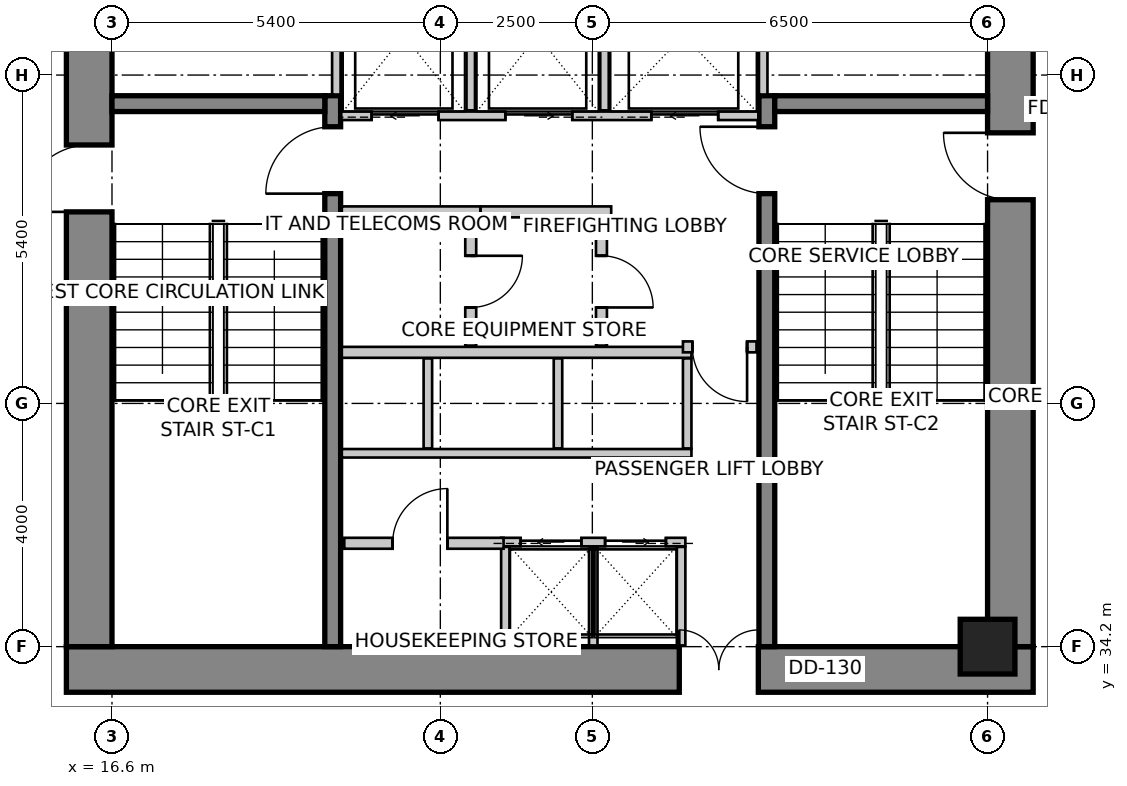
"""IFC4 building model, lengths in metres.
Left out: names, types, materials, properties, quantities, classifications, styles, units other than length and angle.
Written with IfcOpenShell. Run it as: python <this file> out.ifc"""

import sys

from ifc_helpers import new_model, si_unit, direction, frame, frame_2d, origin, origin_2d, place, context, subcontext, project, spatial, rectangle, extrude, source, transform, mapped, element, fill, save


model = new_model("IFC4")
c1 = context("Model", 3, precision=1e-05, world=origin(), true_north=direction((0.0, 1.0)))
c2 = subcontext(c1, "Body", "Model", "MODEL_VIEW")
j1 = project(units=[si_unit("LENGTHUNIT", "METRE"), si_unit("PLANEANGLEUNIT", "RADIAN")], contexts=[c1])
p1 = place(None, origin())
s1 = spatial("IfcSite", under=j1, at=p1, CompositionType="ELEMENT")
p2 = place(p1, origin())
s2 = spatial("IfcBuilding", under=s1, at=p2, CompositionType="ELEMENT")
p3 = place(p2, frame((0.0, 0.0, 135.8)))
s3 = spatial("IfcBuildingStorey", under=s2, at=p3, CompositionType="ELEMENT", Elevation=135.8)
p4 = place(p3, frame((15.85, 33.825, 0.0), z_axis=(0.0, 0.0, 1.0), x_axis=(1.0, 0.0, 0.0)))
e1 = element("IfcWall", 1, at=p4, inside=s3, PredefinedType="SHEAR", context=c2, shape_type="SweptSolid", body=[
    extrude(rectangle(XDim=15.9, YDim=0.75, at=frame_2d((7.95, 0.0))), origin(), (0.0, 0.0, 1.0), 3.6),
])
m1 = source(origin(), c2, "Body", "SweptSolid", [
    extrude(rectangle(XDim=1.3, YDim=2.15, at=frame_2d((0.65, 1.075))), frame((0.0, 0.385, 0.0), z_axis=(0.0, -1.0, 0.0), x_axis=(1.0, 0.0, 0.0)), (0.0, 0.0, 1.0), 0.77),
])
p5 = place(p4, frame((10.08, 0.0, 0.0)))
e2 = element("IfcOpeningElement", 2, at=p5, cuts=e1, PredefinedType="OPENING", context=c2, shape_type="MappedRepresentation", body=[
    mapped(m1, transform((0.0, 0.0, 0.0), scale=1.0)),
])
p6 = place(p3, frame((16.225, 34.2, 0.0), z_axis=(0.0, 0.0, 1.0), x_axis=(0.0, 1.0, 0.0)))
e3 = element("IfcWall", 3, at=p6, inside=s3, PredefinedType="SHEAR", context=c2, shape_type="SweptSolid", body=[
    extrude(rectangle(XDim=11.4, YDim=0.75, at=frame_2d((5.7, 0.0))), origin(), (0.0, 0.0, 1.0), 3.6),
])
m2 = source(origin(), c2, "Body", "SweptSolid", [
    extrude(rectangle(XDim=1.1, YDim=2.15, at=frame_2d((0.55, 1.075))), frame((0.0, 0.385, 0.0), z_axis=(0.0, -1.0, 0.0), x_axis=(1.0, 0.0, 0.0)), (0.0, 0.0, 1.0), 0.77),
])
p7 = place(p6, frame((7.15, 0.0, 0.0)))
e4 = element("IfcOpeningElement", 4, at=p7, cuts=e3, PredefinedType="OPENING", context=c2, shape_type="MappedRepresentation", body=[
    mapped(m2, transform((0.0, 0.0, 0.0), scale=1.0)),
])
p8 = place(p3, frame((31.375, 34.2, 0.0), z_axis=(0.0, 0.0, 1.0), x_axis=(0.0, 1.0, 0.0)))
e5 = element("IfcWall", 5, at=p8, inside=s3, PredefinedType="SHEAR", context=c2, shape_type="SweptSolid", body=[
    extrude(rectangle(XDim=11.4, YDim=0.75, at=frame_2d((5.7, 0.0))), origin(), (0.0, 0.0, 1.0), 3.6),
])
p9 = place(p8, frame((7.35, 0.0, 0.0)))
e6 = element("IfcOpeningElement", 6, at=p9, cuts=e5, PredefinedType="OPENING", context=c2, shape_type="MappedRepresentation", body=[
    mapped(m2, transform((0.0, 0.0, 0.0), scale=1.0)),
])
p10 = place(p3, frame((20.23, 34.2, 0.0), z_axis=(0.0, 0.0, 1.0), x_axis=(0.0, 1.0, 0.0)))
e7 = element("IfcWall", 7, at=p10, inside=s3, PredefinedType="SHEAR", context=c2, shape_type="SweptSolid", body=[
    extrude(rectangle(XDim=9.06, YDim=0.26, at=frame_2d((4.53, 0.0))), origin(), (0.0, 0.0, 1.0), 3.6),
])
m3 = source(origin(), c2, "Body", "SweptSolid", [
    extrude(rectangle(XDim=1.1, YDim=2.15, at=frame_2d((0.55, 1.075))), frame((0.0, 0.14, 0.0), z_axis=(0.0, -1.0, 0.0), x_axis=(1.0, 0.0, 0.0)), (0.0, 0.0, 1.0), 0.28),
])
p11 = place(p10, frame((7.45, 0.0, 0.0)))
e8 = element("IfcOpeningElement", 8, at=p11, cuts=e7, PredefinedType="OPENING", context=c2, shape_type="MappedRepresentation", body=[
    mapped(m3, transform((0.0, 0.0, 0.0), scale=1.0)),
])
p12 = place(p3, frame((27.37, 34.2, 0.0), z_axis=(0.0, 0.0, 1.0), x_axis=(0.0, 1.0, 0.0)))
e9 = element("IfcWall", 9, at=p12, inside=s3, PredefinedType="SHEAR", context=c2, shape_type="SweptSolid", body=[
    extrude(rectangle(XDim=9.06, YDim=0.26, at=frame_2d((4.53, 0.0))), origin(), (0.0, 0.0, 1.0), 3.6),
])
p13 = place(p12, frame((7.45, 0.0, 0.0)))
e10 = element("IfcOpeningElement", 10, at=p13, cuts=e9, PredefinedType="OPENING", context=c2, shape_type="MappedRepresentation", body=[
    mapped(m3, transform((0.0, 0.0, 0.0), scale=1.0)),
])
for number, where, z_axis, x_axis in (
    (11, (16.6, 43.13, 0.0), (0.0, 0.0, 1.0), (1.0, 0.0, 0.0)),
    (12, (27.5, 43.13, 0.0), (0.0, 0.0, 1.0), (1.0, 0.0, 0.0)),
):
    element("IfcWall", number, at=place(p3, frame(where, z_axis=z_axis, x_axis=x_axis)), inside=s3, PredefinedType="SHEAR", context=c2, shape_type="SweptSolid", body=[
        extrude(rectangle(XDim=3.5, YDim=0.26, at=frame_2d((1.75, 0.0))), origin(), (0.0, 0.0, 1.0), 3.6),
    ])
m4 = source(origin(), c2, "Body", "SweptSolid", [
    extrude(rectangle(XDim=0.9, YDim=0.9, at=origin_2d()), origin(), (0.0, 0.0, 1.0), 3.6),
])
p14 = place(p3, frame((31.0, 34.2, 0.0), z_axis=(0.0, 0.0, 1.0), x_axis=(1.0, 0.0, 0.0)))
e13 = element("IfcColumn", 13, at=p14, inside=s3, PredefinedType="COLUMN", context=c2, shape_type="MappedRepresentation", body=[
    mapped(m4, transform((0.0, 0.0, 0.0), scale=1.0)),
])
p15 = place(p3, frame((20.37, 42.93, 0.0), z_axis=(0.0, 0.0, 1.0), x_axis=(1.0, 0.0, 0.0)))
e14 = element("IfcWall", 14, at=p15, inside=s3, PredefinedType="SOLIDWALL", context=c2, shape_type="SweptSolid", body=[
    extrude(rectangle(XDim=6.86, YDim=0.14, at=frame_2d((3.43, 0.0))), origin(), (0.0, 0.0, 1.0), 3.3),
])
m5 = source(origin(), c2, "Body", "SweptSolid", [
    extrude(rectangle(XDim=1.1, YDim=2.15, at=frame_2d((0.55, 1.075))), frame((0.0, 0.08, 0.0), z_axis=(0.0, -1.0, 0.0), x_axis=(1.0, 0.0, 0.0)), (0.0, 0.0, 1.0), 0.16),
])
p16 = place(p15, frame((0.5, 0.0, 0.0)))
e15 = element("IfcOpeningElement", 15, at=p16, cuts=e14, PredefinedType="OPENING", context=c2, shape_type="MappedRepresentation", body=[
    mapped(m5, transform((0.0, 0.0, 0.0), scale=1.0)),
])
p17 = place(p15, frame((2.7, 0.0, 0.0)))
e16 = element("IfcOpeningElement", 16, at=p17, cuts=e14, PredefinedType="OPENING", context=c2, shape_type="MappedRepresentation", body=[
    mapped(m5, transform((0.0, 0.0, 0.0), scale=1.0)),
])
p18 = place(p15, frame((5.1, 0.0, 0.0)))
e17 = element("IfcOpeningElement", 17, at=p18, cuts=e14, PredefinedType="OPENING", context=c2, shape_type="MappedRepresentation", body=[
    mapped(m5, transform((0.0, 0.0, 0.0), scale=1.0)),
])
for number, where, z_axis, x_axis in (
    (18, (20.29, 43.28, 0.0), (0.0, 0.0, 1.0), (0.0, 1.0, 0.0)),
    (19, (27.31, 43.28, 0.0), (0.0, 0.0, 1.0), (0.0, 1.0, 0.0)),
):
    element("IfcWall", number, at=place(p3, frame(where, z_axis=z_axis, x_axis=x_axis)), inside=s3, PredefinedType="SOLIDWALL", context=c2, shape_type="SweptSolid", body=[
        extrude(rectangle(XDim=2.3, YDim=0.14, at=frame_2d((1.15, 0.0))), origin(), (0.0, 0.0, 1.0), 3.3),
    ])
for number, where, z_axis, x_axis in (
    (20, (22.5, 43.02, 0.0), (0.0, 0.0, 1.0), (0.0, 1.0, 0.0)),
    (21, (24.7, 43.02, 0.0), (0.0, 0.0, 1.0), (0.0, 1.0, 0.0)),
):
    element("IfcWall", number, at=place(p3, frame(where, z_axis=z_axis, x_axis=x_axis)), inside=s3, PredefinedType="SOLIDWALL", context=c2, shape_type="SweptSolid", body=[
        extrude(rectangle(XDim=2.56, YDim=0.14, at=frame_2d((1.28, 0.0))), origin(), (0.0, 0.0, 1.0), 3.3),
    ])
p19 = place(p3, frame((23.0, 35.92, 0.0), z_axis=(0.0, 0.0, 1.0), x_axis=(1.0, 0.0, 0.0)))
e22 = element("IfcWall", 22, at=p19, inside=s3, PredefinedType="SOLIDWALL", context=c2, shape_type="SweptSolid", body=[
    extrude(rectangle(XDim=3.03, YDim=0.14, at=frame_2d((1.515, 0.0))), origin(), (0.0, 0.0, 1.0), 3.3),
])
m6 = source(origin(), c2, "Body", "SweptSolid", [
    extrude(rectangle(XDim=1.0, YDim=2.15, at=frame_2d((0.5, 1.075))), frame((0.0, 0.08, 0.0), z_axis=(0.0, -1.0, 0.0), x_axis=(1.0, 0.0, 0.0)), (0.0, 0.0, 1.0), 0.16),
])
p20 = place(p19, frame((0.32, 0.0, 0.0)))
e23 = element("IfcOpeningElement", 23, at=p20, cuts=e22, PredefinedType="OPENING", context=c2, shape_type="MappedRepresentation", body=[
    mapped(m6, transform((0.0, 0.0, 0.0), scale=1.0)),
])
p21 = place(p19, frame((1.71, 0.0, 0.0)))
e24 = element("IfcOpeningElement", 24, at=p21, cuts=e22, PredefinedType="OPENING", context=c2, shape_type="MappedRepresentation", body=[
    mapped(m6, transform((0.0, 0.0, 0.0), scale=1.0)),
])
for number, where, z_axis, x_axis in (
    (25, (25.96, 34.22, 0.0), (0.0, 0.0, 1.0), (0.0, 1.0, 0.0)),
    (26, (23.07, 34.22, 0.0), (0.0, 0.0, 1.0), (0.0, 1.0, 0.0)),
    (27, (24.515, 34.22, 0.0), (0.0, 0.0, 1.0), (0.0, 1.0, 0.0)),
):
    element("IfcWall", number, at=place(p3, frame(where, z_axis=z_axis, x_axis=x_axis)), inside=s3, PredefinedType="SOLIDWALL", context=c2, shape_type="SweptSolid", body=[
        extrude(rectangle(XDim=1.62, YDim=0.14, at=frame_2d((0.81, 0.0))), origin(), (0.0, 0.0, 1.0), 2.592),
    ])
p22 = place(p3, frame((20.38, 37.38, 0.0), z_axis=(0.0, 0.0, 1.0), x_axis=(1.0, 0.0, 0.0)))
e28 = element("IfcWall", 28, at=p22, inside=s3, PredefinedType="SOLIDWALL", context=c2, shape_type="SweptSolid", body=[
    extrude(rectangle(XDim=5.75, YDim=0.14, at=frame_2d((2.875, 0.0))), origin(), (0.0, 0.0, 1.0), 3.3),
])
p23 = place(p3, frame((20.38, 39.04, 0.0), z_axis=(0.0, 0.0, 1.0), x_axis=(1.0, 0.0, 0.0)))
e29 = element("IfcWall", 29, at=p23, inside=s3, PredefinedType="SOLIDWALL", context=c2, shape_type="SweptSolid", body=[
    extrude(rectangle(XDim=5.75, YDim=0.18, at=frame_2d((2.875, 0.0))), origin(), (0.0, 0.0, 1.0), 3.3),
])
for number, where, z_axis, x_axis in (
    (30, (26.06, 37.46, 0.0), (0.0, 0.0, 1.0), (0.0, 1.0, 0.0)),
    (31, (21.795, 37.46, 0.0), (0.0, 0.0, 1.0), (0.0, 1.0, 0.0)),
    (32, (23.935, 37.46, 0.0), (0.0, 0.0, 1.0), (0.0, 1.0, 0.0)),
):
    element("IfcWall", number, at=place(p3, frame(where, z_axis=z_axis, x_axis=x_axis)), inside=s3, PredefinedType="SOLIDWALL", context=c2, shape_type="SweptSolid", body=[
        extrude(rectangle(XDim=1.48, YDim=0.14, at=frame_2d((0.74, 0.0))), origin(), (0.0, 0.0, 1.0), 3.3),
    ])
p24 = place(p3, frame((22.66, 41.35, 0.0), z_axis=(0.0, 0.0, 1.0), x_axis=(-1.0, 0.0, 0.0)))
e33 = element("IfcWall", 33, at=p24, inside=s3, PredefinedType="PARTITIONING", context=c2, shape_type="SweptSolid", body=[
    extrude(rectangle(XDim=2.28, YDim=0.18, at=frame_2d((1.14, 0.0))), origin(), (0.0, 0.0, 1.0), 3.3),
])
p25 = place(p3, frame((24.81, 41.35, 0.0), z_axis=(0.0, 0.0, 1.0), x_axis=(-1.0, 0.0, 0.0)))
e34 = element("IfcWall", 34, at=p25, inside=s3, PredefinedType="PARTITIONING", context=c2, shape_type="SweptSolid", body=[
    extrude(rectangle(XDim=2.148, YDim=0.18, at=frame_2d((1.074, 0.0))), origin(), (0.0, 0.0, 1.0), 3.3),
])
p26 = place(p3, frame((22.5, 41.256, 0.0), z_axis=(0.0, 0.0, 1.0), x_axis=(0.0, -1.0, 0.0)))
e35 = element("IfcWall", 35, at=p26, inside=s3, PredefinedType="PARTITIONING", context=c2, shape_type="SweptSolid", body=[
    extrude(rectangle(XDim=2.106, YDim=0.18, at=frame_2d((1.053, 0.0))), origin(), (0.0, 0.0, 1.0), 3.3),
])
m7 = source(origin(), c2, "Body", "SweptSolid", [
    extrude(rectangle(XDim=0.85, YDim=2.15, at=frame_2d((0.425, 1.075))), frame((0.0, 0.1, 0.0), z_axis=(0.0, -1.0, 0.0), x_axis=(1.0, 0.0, 0.0)), (0.0, 0.0, 1.0), 0.2),
])
p27 = place(p26, frame((0.628, 0.0, 0.0)))
e36 = element("IfcOpeningElement", 36, at=p27, cuts=e35, PredefinedType="OPENING", context=c2, shape_type="MappedRepresentation", body=[
    mapped(m7, transform((0.0, 0.0, 0.0), scale=1.0)),
])
p28 = place(p3, frame((24.65, 41.256, 0.0), z_axis=(0.0, 0.0, 1.0), x_axis=(0.0, -1.0, 0.0)))
e37 = element("IfcWall", 37, at=p28, inside=s3, PredefinedType="PARTITIONING", context=c2, shape_type="SweptSolid", body=[
    extrude(rectangle(XDim=2.106, YDim=0.18, at=frame_2d((1.053, 0.0))), origin(), (0.0, 0.0, 1.0), 3.3),
])
p29 = place(p28, frame((0.628, 0.0, 0.0)))
e38 = element("IfcOpeningElement", 38, at=p29, cuts=e37, PredefinedType="OPENING", context=c2, shape_type="MappedRepresentation", body=[
    mapped(m7, transform((0.0, 0.0, 0.0), scale=1.0)),
])
p30 = place(p3, frame((27.2, 39.13, 0.0), z_axis=(0.0, 0.0, 1.0), x_axis=(-1.0, 0.0, 0.0)))
e39 = element("IfcWall", 39, at=p30, inside=s3, PredefinedType="PARTITIONING", context=c2, shape_type="SweptSolid", body=[
    extrude(rectangle(XDim=1.21, YDim=0.18, at=frame_2d((0.605, 0.0))), origin(), (0.0, 0.0, 1.0), 3.3),
])
m8 = source(origin(), c2, "Body", "SweptSolid", [
    extrude(rectangle(XDim=0.9, YDim=2.15, at=frame_2d((0.45, 1.075))), frame((0.0, 0.1, 0.0), z_axis=(0.0, -1.0, 0.0), x_axis=(1.0, 0.0, 0.0)), (0.0, 0.0, 1.0), 0.2),
])
p31 = place(p30, frame((0.155, 0.0, 0.0)))
e40 = element("IfcOpeningElement", 40, at=p31, cuts=e39, PredefinedType="OPENING", context=c2, shape_type="MappedRepresentation", body=[
    mapped(m8, transform((0.0, 0.0, 0.0), scale=1.0)),
])
p32 = place(p3, frame((20.42, 35.9, 0.0), z_axis=(0.0, 0.0, 1.0), x_axis=(1.0, 0.0, 0.0)))
e41 = element("IfcWall", 41, at=p32, inside=s3, PredefinedType="PARTITIONING", context=c2, shape_type="SweptSolid", body=[
    extrude(rectangle(XDim=2.62, YDim=0.18, at=frame_2d((1.31, 0.0))), origin(), (0.0, 0.0, 1.0), 3.3),
])
p33 = place(p32, frame((0.796, 0.0, 0.0)))
e42 = element("IfcOpeningElement", 42, at=p33, cuts=e41, PredefinedType="OPENING", context=c2, shape_type="MappedRepresentation", body=[
    mapped(m8, transform((0.0, 0.0, 0.0), scale=1.0)),
])
m9 = source(origin(), c2, "Body", "SweptSolid", [
    extrude(rectangle(XDim=1.1, YDim=2.15, at=frame_2d((0.55, 1.075))), frame((0.0, 0.025, 0.0), z_axis=(0.0, -1.0, 0.0), x_axis=(1.0, 0.0, 0.0)), (0.0, 0.0, 1.0), 0.05),
])
p34 = place(p16, origin())
e43 = element("IfcDoor", 43, at=p34, inside=s3, OperationType="SLIDING_TO_LEFT", PredefinedType="DOOR", context=c2, shape_type="MappedRepresentation", body=[
    mapped(m9, transform((0.0, 0.0, 0.0), scale=1.0)),
])
fill(e15, e43)
p35 = place(p17, origin())
e44 = element("IfcDoor", 44, at=p35, inside=s3, OperationType="SLIDING_TO_RIGHT", PredefinedType="DOOR", context=c2, shape_type="MappedRepresentation", body=[
    mapped(m9, transform((0.0, 0.0, 0.0), scale=1.0)),
])
fill(e16, e44)
m10 = source(origin(), c2, "Body", "SweptSolid", [
    extrude(rectangle(XDim=1.1, YDim=2.15, at=frame_2d((0.55, 1.075))), frame((0.0, 0.025, 0.0), z_axis=(0.0, -1.0, 0.0), x_axis=(1.0, 0.0, 0.0)), (0.0, 0.0, 1.0), 0.05),
])
p36 = place(p18, origin())
e45 = element("IfcDoor", 45, at=p36, inside=s3, OperationType="SLIDING_TO_LEFT", PredefinedType="DOOR", context=c2, shape_type="MappedRepresentation", body=[
    mapped(m10, transform((0.0, 0.0, 0.0), scale=1.0)),
])
fill(e17, e45)
m11 = source(origin(), c2, "Body", "SweptSolid", [
    extrude(rectangle(XDim=1.0, YDim=2.15, at=frame_2d((0.5, 1.075))), frame((0.0, 0.025, 0.0), z_axis=(0.0, -1.0, 0.0), x_axis=(1.0, 0.0, 0.0)), (0.0, 0.0, 1.0), 0.05),
])
p37 = place(p20, origin())
e46 = element("IfcDoor", 46, at=p37, inside=s3, OperationType="SLIDING_TO_LEFT", PredefinedType="DOOR", context=c2, shape_type="MappedRepresentation", body=[
    mapped(m11, transform((0.0, 0.0, 0.0), scale=1.0)),
])
fill(e23, e46)
p38 = place(p21, origin())
e47 = element("IfcDoor", 47, at=p38, inside=s3, OperationType="SLIDING_TO_RIGHT", PredefinedType="DOOR", context=c2, shape_type="MappedRepresentation", body=[
    mapped(m11, transform((0.0, 0.0, 0.0), scale=1.0)),
])
fill(e24, e47)
m12 = source(origin(), c2, "Body", "SweptSolid", [
    extrude(rectangle(XDim=1.1, YDim=2.15, at=frame_2d((0.55, 1.075))), frame((0.0, 0.025, 0.0), z_axis=(0.0, -1.0, 0.0), x_axis=(1.0, 0.0, 0.0)), (0.0, 0.0, 1.0), 0.05),
])
p39 = place(p11, origin())
e48 = element("IfcDoor", 48, at=p39, inside=s3, OperationType="SINGLE_SWING_LEFT", PredefinedType="DOOR", context=c2, shape_type="MappedRepresentation", body=[
    mapped(m12, transform((0.0, 0.0, 0.0), scale=1.0)),
])
fill(e8, e48)
p40 = place(p13, origin())
e49 = element("IfcDoor", 49, at=p40, inside=s3, OperationType="SINGLE_SWING_RIGHT", PredefinedType="DOOR", context=c2, shape_type="MappedRepresentation", body=[
    mapped(m12, transform((0.0, 0.0, 0.0), scale=1.0)),
])
fill(e10, e49)
p41 = place(p7, origin())
e50 = element("IfcDoor", 50, at=p41, inside=s3, OperationType="SINGLE_SWING_LEFT", PredefinedType="DOOR", context=c2, shape_type="MappedRepresentation", body=[
    mapped(m12, transform((0.0, 0.0, 0.0), scale=1.0)),
])
fill(e4, e50)
p42 = place(p9, origin())
e51 = element("IfcDoor", 51, at=p42, inside=s3, OperationType="SINGLE_SWING_RIGHT", PredefinedType="DOOR", context=c2, shape_type="MappedRepresentation", body=[
    mapped(m12, transform((0.0, 0.0, 0.0), scale=1.0)),
])
fill(e6, e51)
m13 = source(origin(), c2, "Body", "SweptSolid", [
    extrude(rectangle(XDim=1.3, YDim=2.15, at=frame_2d((0.65, 1.075))), frame((0.0, 0.025, 0.0), z_axis=(0.0, -1.0, 0.0), x_axis=(1.0, 0.0, 0.0)), (0.0, 0.0, 1.0), 0.05),
])
p43 = place(p5, origin())
e52 = element("IfcDoor", 52, at=p43, inside=s3, OperationType="DOUBLE_DOOR_SINGLE_SWING", PredefinedType="DOOR", context=c2, shape_type="MappedRepresentation", body=[
    mapped(m13, transform((0.0, 0.0, 0.0), scale=1.0)),
])
fill(e2, e52)
m14 = source(origin(), c2, "Body", "SweptSolid", [
    extrude(rectangle(XDim=0.85, YDim=2.15, at=frame_2d((0.425, 1.075))), frame((0.0, 0.025, 0.0), z_axis=(0.0, -1.0, 0.0), x_axis=(1.0, 0.0, 0.0)), (0.0, 0.0, 1.0), 0.05),
])
p44 = place(p27, origin())
e53 = element("IfcDoor", 53, at=p44, inside=s3, OperationType="SINGLE_SWING_LEFT", PredefinedType="DOOR", context=c2, shape_type="MappedRepresentation", body=[
    mapped(m14, transform((0.0, 0.0, 0.0), scale=1.0)),
])
fill(e36, e53)
p45 = place(p29, origin())
e54 = element("IfcDoor", 54, at=p45, inside=s3, OperationType="SINGLE_SWING_RIGHT", PredefinedType="DOOR", context=c2, shape_type="MappedRepresentation", body=[
    mapped(m14, transform((0.0, 0.0, 0.0), scale=1.0)),
])
fill(e38, e54)
m15 = source(origin(), c2, "Body", "SweptSolid", [
    extrude(rectangle(XDim=0.9, YDim=2.15, at=frame_2d((0.45, 1.075))), frame((0.0, 0.025, 0.0), z_axis=(0.0, -1.0, 0.0), x_axis=(1.0, 0.0, 0.0)), (0.0, 0.0, 1.0), 0.05),
])
p46 = place(p31, origin())
e55 = element("IfcDoor", 55, at=p46, inside=s3, OperationType="SINGLE_SWING_LEFT", PredefinedType="DOOR", context=c2, shape_type="MappedRepresentation", body=[
    mapped(m15, transform((0.0, 0.0, 0.0), scale=1.0)),
])
fill(e40, e55)
p47 = place(p33, origin())
e56 = element("IfcDoor", 56, at=p47, inside=s3, OperationType="SINGLE_SWING_RIGHT", PredefinedType="DOOR", context=c2, shape_type="MappedRepresentation", body=[
    mapped(m15, transform((0.0, 0.0, 0.0), scale=1.0)),
])
fill(e42, e56)
save(model, sys.argv[1])
